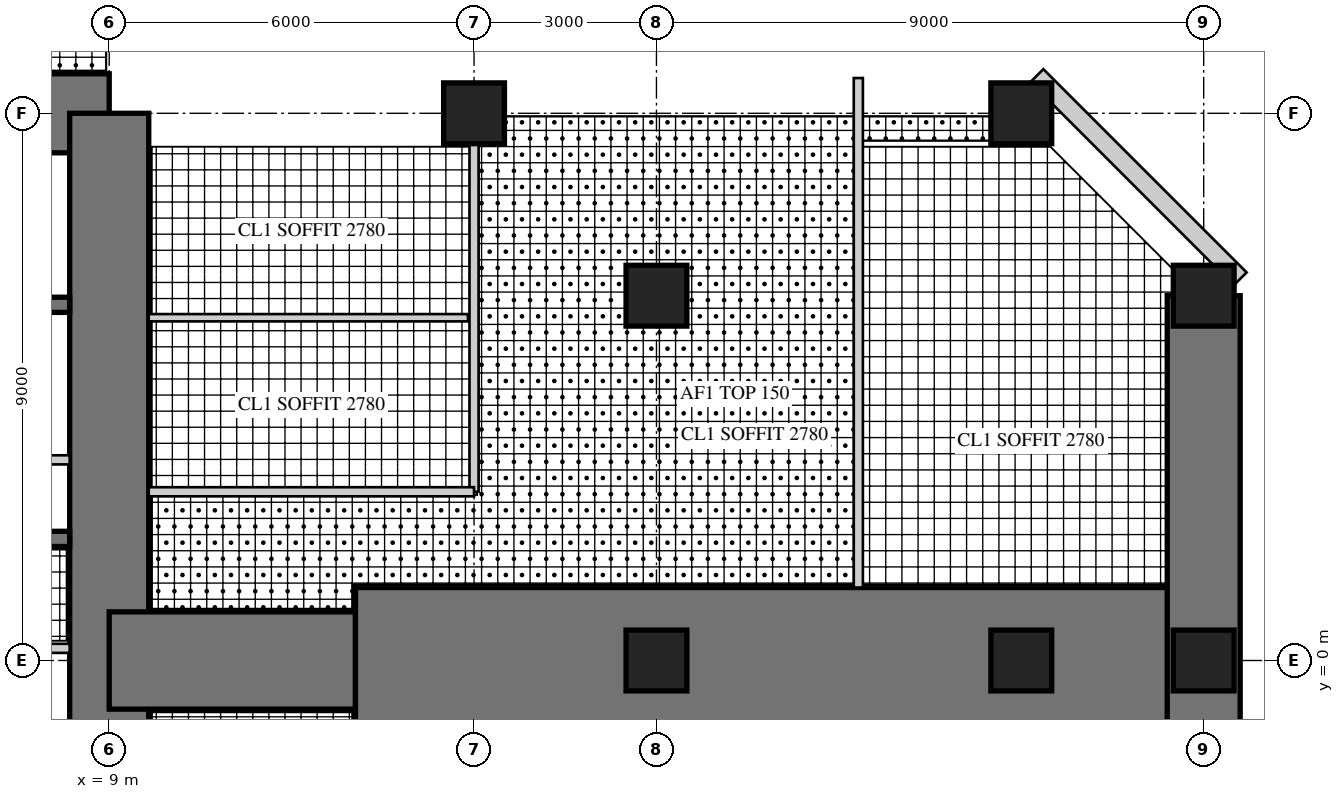
"""IFC4 building model, lengths in metres.
Left out: names, types, materials, properties, quantities, classifications, styles, units other than length and angle.
Written with IfcOpenShell. Run it as: python <this file> out.ifc"""

import sys

from ifc_helpers import new_model, si_unit, direction, frame, frame_2d, origin, origin_2d, place, context, subcontext, project, spatial, rectangle, hollow_rectangle, extrude, element, fill, save


model = new_model("IFC4")
c1 = context("Model", 3, precision=1e-05, world=origin(), true_north=direction((0.0, 1.0)))
c2 = subcontext(c1, "Body", "Model", "MODEL_VIEW")
j1 = project(units=[si_unit("LENGTHUNIT", "METRE"), si_unit("PLANEANGLEUNIT", "RADIAN")], contexts=[c1])
p1 = place(None, origin())
s1 = spatial("IfcSite", under=j1, at=p1, CompositionType="ELEMENT")
p2 = place(p1, origin())
s2 = spatial("IfcBuilding", under=s1, at=p2, CompositionType="ELEMENT")
p3 = place(p2, frame((0.0, 0.0, 152.5)))
s3 = spatial("IfcBuildingStorey", under=s2, at=p3, CompositionType="ELEMENT", Elevation=152.5)
p4 = place(p3, frame((9.0, 9.0, 0.0), z_axis=(0.0, 0.0, 1.0), x_axis=(-1.0, 0.0, 0.0)))
e1 = element("IfcWall", 1, at=p4, inside=s3, PredefinedType="SHEAR", context=c2, shape_type="SweptSolid", body=[
    extrude(rectangle(XDim=18.0, YDim=1.3, at=frame_2d((9.0, 0.0))), origin(), (0.0, 0.0, 1.0), 4.0),
])
p5 = place(p4, frame((9.8, 0.0, 0.0)))
e2 = element("IfcOpeningElement", 2, at=p5, cuts=e1, PredefinedType="OPENING", context=c2, shape_type="SweptSolid", body=[
    extrude(rectangle(XDim=1.0, YDim=2.4, at=frame_2d((0.5, 1.2))), frame((0.0, 0.66, 0.0), z_axis=(0.0, -1.0, 0.0), x_axis=(1.0, 0.0, 0.0)), (0.0, 0.0, 1.0), 1.32),
])
p6 = place(p3, frame((9.0, -9.0, 0.0), z_axis=(0.0, 0.0, 1.0), x_axis=(0.0, 1.0, 0.0)))
e3 = element("IfcWall", 3, at=p6, inside=s3, PredefinedType="SHEAR", context=c2, shape_type="SweptSolid", body=[
    extrude(rectangle(XDim=18.0, YDim=1.3, at=frame_2d((9.0, 0.0))), origin(), (0.0, 0.0, 1.0), 4.0),
])
p7 = place(p6, frame((9.8, 0.0, 0.0)))
e4 = element("IfcOpeningElement", 4, at=p7, cuts=e3, PredefinedType="OPENING", context=c2, shape_type="SweptSolid", body=[
    extrude(rectangle(XDim=1.0, YDim=2.4, at=frame_2d((0.5, 1.2))), frame((0.0, 0.66, 0.0), z_axis=(0.0, -1.0, 0.0), x_axis=(1.0, 0.0, 0.0)), (0.0, 0.0, 1.0), 1.32),
])
p8 = place(p3, frame((1.925, 2.0, 0.0), z_axis=(0.0, 0.0, 1.0), x_axis=(1.0, 0.0, 0.0)))
e5 = element("IfcWall", 5, at=p8, inside=s3, PredefinedType="SHEAR", context=c2, shape_type="SweptSolid", body=[
    extrude(rectangle(XDim=6.425, YDim=0.25, at=frame_2d((3.212, 0.0))), origin(), (0.0, 0.0, 1.0), 4.0),
])
p9 = place(p3, frame((1.925, 5.85, 0.0), z_axis=(0.0, 0.0, 1.0), x_axis=(1.0, 0.0, 0.0)))
e6 = element("IfcWall", 6, at=p9, inside=s3, PredefinedType="SHEAR", context=c2, shape_type="SweptSolid", body=[
    extrude(rectangle(XDim=6.425, YDim=0.25, at=frame_2d((3.212, 0.0))), origin(), (0.0, 0.0, 1.0), 4.0),
])
p10 = place(p9, frame((0.454, 0.0, 0.0)))
e7 = element("IfcOpeningElement", 7, at=p10, cuts=e6, PredefinedType="OPENING", context=c2, shape_type="SweptSolid", body=[
    extrude(rectangle(XDim=1.1, YDim=2.2, at=frame_2d((0.55, 1.1))), frame((0.0, 0.135, 0.0), z_axis=(0.0, -1.0, 0.0), x_axis=(1.0, 0.0, 0.0)), (0.0, 0.0, 1.0), 0.27),
])
p11 = place(p9, frame((2.663, 0.0, 0.0)))
e8 = element("IfcOpeningElement", 8, at=p11, cuts=e6, PredefinedType="OPENING", context=c2, shape_type="SweptSolid", body=[
    extrude(rectangle(XDim=1.1, YDim=2.2, at=frame_2d((0.55, 1.1))), frame((0.0, 0.135, 0.0), z_axis=(0.0, -1.0, 0.0), x_axis=(1.0, 0.0, 0.0)), (0.0, 0.0, 1.0), 0.27),
])
p12 = place(p9, frame((4.871, 0.0, 0.0)))
e9 = element("IfcOpeningElement", 9, at=p12, cuts=e6, PredefinedType="OPENING", context=c2, shape_type="SweptSolid", body=[
    extrude(rectangle(XDim=1.1, YDim=2.2, at=frame_2d((0.55, 1.1))), frame((0.0, 0.135, 0.0), z_axis=(0.0, -1.0, 0.0), x_axis=(1.0, 0.0, 0.0)), (0.0, 0.0, 1.0), 0.27),
])
p13 = place(p3, frame((1.925, 3.3, 0.0), z_axis=(0.0, 0.0, 1.0), x_axis=(1.0, 0.0, 0.0)))
e10 = element("IfcWall", 10, at=p13, inside=s3, PredefinedType="PARTITIONING", context=c2, shape_type="SweptSolid", body=[
    extrude(rectangle(XDim=6.425, YDim=0.15, at=frame_2d((3.212, 0.0))), origin(), (0.0, 0.0, 1.0), 4.0),
])
p14 = place(p13, frame((0.075, 0.0, 0.0)))
e11 = element("IfcOpeningElement", 11, at=p14, cuts=e10, PredefinedType="OPENING", context=c2, shape_type="SweptSolid", body=[
    extrude(rectangle(XDim=0.8, YDim=2.1, at=frame_2d((0.4, 1.05))), frame((0.0, 0.085, 0.0), z_axis=(0.0, -1.0, 0.0), x_axis=(1.0, 0.0, 0.0)), (0.0, 0.0, 1.0), 0.17),
])
p15 = place(p13, frame((3.675, 0.0, 0.0)))
e12 = element("IfcOpeningElement", 12, at=p15, cuts=e10, PredefinedType="OPENING", context=c2, shape_type="SweptSolid", body=[
    extrude(rectangle(XDim=0.8, YDim=2.1, at=frame_2d((0.4, 1.05))), frame((0.0, 0.085, 0.0), z_axis=(0.0, -1.0, 0.0), x_axis=(1.0, 0.0, 0.0)), (0.0, 0.0, 1.0), 0.17),
])
p16 = place(p3, frame((9.0, 0.0, 0.0), z_axis=(0.0, 0.0, 1.0), x_axis=(1.0, 0.0, 0.0)))
e13 = element("IfcWall", 13, at=p16, inside=s3, PredefinedType="SHEAR", context=c2, shape_type="SweptSolid", body=[
    extrude(rectangle(XDim=4.05, YDim=1.6, at=frame_2d((2.025, 0.0))), origin(), (0.0, 0.0, 1.0), 4.0),
])
p17 = place(p3, frame((13.05, 0.0, 0.0), z_axis=(0.0, 0.0, 1.0), x_axis=(1.0, 0.0, 0.0)))
e14 = element("IfcWall", 14, at=p17, inside=s3, PredefinedType="SHEAR", context=c2, shape_type="SweptSolid", body=[
    extrude(rectangle(XDim=13.95, YDim=2.4, at=frame_2d((6.975, 0.0))), origin(), (0.0, 0.0, 1.0), 4.0),
])
p18 = place(p17, frame((5.75, 0.0, 0.0)))
e15 = element("IfcOpeningElement", 15, at=p18, cuts=e14, PredefinedType="OPENING", context=c2, shape_type="SweptSolid", body=[
    extrude(rectangle(XDim=1.0, YDim=2.2, at=frame_2d((0.5, 1.1))), frame((0.0, 1.21, 0.0), z_axis=(0.0, -1.0, 0.0), x_axis=(1.0, 0.0, 0.0)), (0.0, 0.0, 1.0), 2.42),
])
p19 = place(p3, frame((27.0, -6.0, 0.0), z_axis=(0.0, 0.0, 1.0), x_axis=(0.0, 1.0, 0.0)))
e16 = element("IfcWall", 16, at=p19, inside=s3, PredefinedType="SHEAR", context=c2, shape_type="SweptSolid", body=[
    extrude(rectangle(XDim=12.0, YDim=1.2, at=frame_2d((6.0, 0.0))), origin(), (0.0, 0.0, 1.0), 4.0),
])
p20 = place(p19, frame((1.25, 0.0, 0.6)))
e17 = element("IfcOpeningElement", 17, at=p20, cuts=e16, PredefinedType="OPENING", context=c2, shape_type="SweptSolid", body=[
    extrude(rectangle(XDim=3.0, YDim=2.4, at=frame_2d((1.5, 1.2))), frame((0.0, 0.61, 0.0), z_axis=(0.0, -1.0, 0.0), x_axis=(1.0, 0.0, 0.0)), (0.0, 0.0, 1.0), 1.22),
])
p21 = place(p19, frame((7.75, 0.0, 0.6)))
e18 = element("IfcOpeningElement", 18, at=p21, cuts=e16, PredefinedType="OPENING", context=c2, shape_type="SweptSolid", body=[
    extrude(rectangle(XDim=3.0, YDim=2.4, at=frame_2d((1.5, 1.2))), frame((0.0, 0.61, 0.0), z_axis=(0.0, -1.0, 0.0), x_axis=(1.0, 0.0, 0.0)), (0.0, 0.0, 1.0), 1.22),
])
for number, where, z_axis, x_axis in (
    (19, (15.0, 9.0, 0.0), (0.0, 0.0, 1.0), (1.0, 0.0, 0.0)),
    (20, (24.0, 9.0, 0.0), (0.0, 0.0, 1.0), (1.0, 0.0, 0.0)),
    (21, (27.0, 0.0, 0.0), (0.0, 0.0, 1.0), (1.0, 0.0, 0.0)),
    (22, (27.0, 6.0, 0.0), (0.0, 0.0, 1.0), (1.0, 0.0, 0.0)),
    (23, (18.0, 0.0, 0.0), (0.0, 0.0, 1.0), (1.0, 0.0, 0.0)),
    (24, (18.0, 6.0, 0.0), (0.0, 0.0, 1.0), (1.0, 0.0, 0.0)),
    (25, (24.0, 0.0, 0.0), (0.0, 0.0, 1.0), (1.0, 0.0, 0.0)),
):
    element("IfcColumn", number, at=place(p3, frame(where, z_axis=z_axis, x_axis=x_axis)), inside=s3, PredefinedType="COLUMN", context=c2, shape_type="SweptSolid", body=[
        extrude(rectangle(XDim=1.0, YDim=1.0, at=origin_2d()), origin(), (0.0, 0.0, 1.0), 4.0),
    ])
p22 = place(p3, frame((27.6, 6.277, 0.0), z_axis=(0.0, 0.0, 1.0), x_axis=(-0.707106781187, 0.707106781187, 0.0)))
e26 = element("IfcWall", 26, at=p22, inside=s3, PredefinedType="SOLIDWALL", context=c2, shape_type="SweptSolid", body=[
    extrude(rectangle(XDim=4.728, YDim=0.3, at=frame_2d((2.364, 0.0))), origin(), (0.0, 0.0, 1.0), 3.8),
])
p23 = place(p22, frame((1.914, 0.0, 0.3)))
e27 = element("IfcOpeningElement", 27, at=p23, cuts=e26, PredefinedType="OPENING", context=c2, shape_type="SweptSolid", body=[
    extrude(rectangle(XDim=0.9, YDim=2.4, at=frame_2d((0.45, 1.2))), frame((0.0, 0.16, 0.0), z_axis=(0.0, -1.0, 0.0), x_axis=(1.0, 0.0, 0.0)), (0.0, 0.0, 1.0), 0.32),
])
p24 = place(p3, frame((2.325, 0.2, 0.0), z_axis=(0.0, 0.0, 1.0), x_axis=(1.0, 0.0, 0.0)))
e28 = element("IfcWall", 28, at=p24, inside=s3, PredefinedType="PARTITIONING", context=c2, shape_type="SweptSolid", body=[
    extrude(rectangle(XDim=6.025, YDim=0.15, at=frame_2d((3.013, 0.0))), origin(), (0.0, 0.0, 1.0), 3.8),
])
p25 = place(p24, frame((0.4, 0.0, 0.0)))
e29 = element("IfcOpeningElement", 29, at=p25, cuts=e28, PredefinedType="OPENING", context=c2, shape_type="SweptSolid", body=[
    extrude(rectangle(XDim=1.0, YDim=2.1, at=frame_2d((0.5, 1.05))), frame((0.0, 0.085, 0.0), z_axis=(0.0, -1.0, 0.0), x_axis=(1.0, 0.0, 0.0)), (0.0, 0.0, 1.0), 0.17),
])
p26 = place(p3, frame((15.0, 2.775, 0.0), z_axis=(0.0, 0.0, 1.0), x_axis=(0.0, 1.0, 0.0)))
e30 = element("IfcWall", 30, at=p26, inside=s3, PredefinedType="PARTITIONING", context=c2, shape_type="SweptSolid", body=[
    extrude(rectangle(XDim=5.725, YDim=0.15, at=frame_2d((2.863, 0.0))), origin(), (0.0, 0.0, 1.0), 3.0),
])
p27 = place(p26, frame((0.931, 0.0, 0.0)))
e31 = element("IfcOpeningElement", 31, at=p27, cuts=e30, PredefinedType="OPENING", context=c2, shape_type="SweptSolid", body=[
    extrude(rectangle(XDim=1.0, YDim=2.1, at=frame_2d((0.5, 1.05))), frame((0.0, 0.085, 0.0), z_axis=(0.0, -1.0, 0.0), x_axis=(1.0, 0.0, 0.0)), (0.0, 0.0, 1.0), 0.17),
])
p28 = place(p26, frame((3.794, 0.0, 0.0)))
e32 = element("IfcOpeningElement", 32, at=p28, cuts=e30, PredefinedType="OPENING", context=c2, shape_type="SweptSolid", body=[
    extrude(rectangle(XDim=1.0, YDim=2.1, at=frame_2d((0.5, 1.05))), frame((0.0, 0.085, 0.0), z_axis=(0.0, -1.0, 0.0), x_axis=(1.0, 0.0, 0.0)), (0.0, 0.0, 1.0), 0.17),
])
p29 = place(p3, frame((9.65, 2.775, 0.0), z_axis=(0.0, 0.0, 1.0), x_axis=(1.0, 0.0, 0.0)))
e33 = element("IfcWall", 33, at=p29, inside=s3, PredefinedType="PARTITIONING", context=c2, shape_type="SweptSolid", body=[
    extrude(rectangle(XDim=5.35, YDim=0.15, at=frame_2d((2.675, 0.0))), origin(), (0.0, 0.0, 1.0), 3.8),
])
p30 = place(p3, frame((9.65, 5.637, 0.0), z_axis=(0.0, 0.0, 1.0), x_axis=(1.0, 0.0, 0.0)))
e34 = element("IfcWall", 34, at=p30, inside=s3, PredefinedType="PLUMBINGWALL", context=c2, shape_type="SweptSolid", body=[
    extrude(rectangle(XDim=5.25, YDim=0.12, at=frame_2d((2.625, 0.0))), origin(), (0.0, 0.0, 1.0), 3.8),
])
p31 = place(p3, frame((21.32, 1.2, 0.0), z_axis=(0.0, 0.0, 1.0), x_axis=(0.0, 1.0, 0.0)))
e35 = element("IfcWall", 35, at=p31, inside=s3, PredefinedType="PARTITIONING", context=c2, shape_type="SweptSolid", body=[
    extrude(rectangle(XDim=8.38, YDim=0.15, at=frame_2d((4.19, 0.0))), origin(), (0.0, 0.0, 1.0), 3.8),
])
p32 = place(p31, frame((0.45, 0.0, 0.0)))
e36 = element("IfcOpeningElement", 36, at=p32, cuts=e35, PredefinedType="OPENING", context=c2, shape_type="SweptSolid", body=[
    extrude(rectangle(XDim=1.0, YDim=2.2, at=frame_2d((0.5, 1.1))), frame((0.0, 0.085, 0.0), z_axis=(0.0, -1.0, 0.0), x_axis=(1.0, 0.0, 0.0)), (0.0, 0.0, 1.0), 0.17),
])
p33 = place(p21, origin())
e37 = element("IfcWindow", 37, at=p33, inside=s3, PartitioningType="SINGLE_PANEL", PredefinedType="WINDOW", context=c2, shape_type="SweptSolid", body=[
    extrude(hollow_rectangle(XDim=3.0, YDim=2.4, WallThickness=0.06, at=frame_2d((1.5, 1.2))), frame((0.0, 0.03, 0.0), z_axis=(0.0, -1.0, 0.0), x_axis=(1.0, 0.0, 0.0)), (0.0, 0.0, 1.0), 0.06),
    extrude(rectangle(XDim=2.879, YDim=2.279, at=frame_2d((1.5, 1.2))), frame((0.0, 0.03, 0.0), z_axis=(0.0, -1.0, 0.0), x_axis=(1.0, 0.0, 0.0)), (0.0, 0.0, 1.0), 0.06),
])
fill(e18, e37)
p34 = place(p23, origin())
e38 = element("IfcWindow", 38, at=p34, inside=s3, PartitioningType="SINGLE_PANEL", PredefinedType="WINDOW", context=c2, shape_type="SweptSolid", body=[
    extrude(hollow_rectangle(XDim=0.9, YDim=2.4, WallThickness=0.06, at=frame_2d((0.45, 1.2))), frame((0.0, 0.03, 0.0), z_axis=(0.0, -1.0, 0.0), x_axis=(1.0, 0.0, 0.0)), (0.0, 0.0, 1.0), 0.06),
    extrude(rectangle(XDim=0.779, YDim=2.279, at=frame_2d((0.45, 1.2))), frame((0.0, 0.03, 0.0), z_axis=(0.0, -1.0, 0.0), x_axis=(1.0, 0.0, 0.0)), (0.0, 0.0, 1.0), 0.06),
])
fill(e27, e38)
p35 = place(p27, origin())
e39 = element("IfcDoor", 39, at=p35, inside=s3, OperationType="SINGLE_SWING_LEFT", PredefinedType="DOOR", context=c2, shape_type="SweptSolid", body=[
    extrude(rectangle(XDim=1.0, YDim=2.1, at=frame_2d((0.5, 1.05))), frame((0.0, 0.025, 0.0), z_axis=(0.0, -1.0, 0.0), x_axis=(1.0, 0.0, 0.0)), (0.0, 0.0, 1.0), 0.05),
])
fill(e31, e39)
p36 = place(p28, origin())
e40 = element("IfcDoor", 40, at=p36, inside=s3, OperationType="SINGLE_SWING_LEFT", PredefinedType="DOOR", context=c2, shape_type="SweptSolid", body=[
    extrude(rectangle(XDim=1.0, YDim=2.1, at=frame_2d((0.5, 1.05))), frame((0.0, 0.025, 0.0), z_axis=(0.0, -1.0, 0.0), x_axis=(1.0, 0.0, 0.0)), (0.0, 0.0, 1.0), 0.05),
])
fill(e32, e40)
p37 = place(p32, frame((1.0, 0.0, 0.0), z_axis=(0.0, 0.0, 1.0), x_axis=(-1.0, 0.0, 0.0)))
e41 = element("IfcDoor", 41, at=p37, inside=s3, OperationType="SINGLE_SWING_RIGHT", PredefinedType="DOOR", context=c2, shape_type="SweptSolid", body=[
    extrude(rectangle(XDim=1.0, YDim=2.2, at=frame_2d((0.5, 1.1))), frame((0.0, 0.025, 0.0), z_axis=(0.0, -1.0, 0.0), x_axis=(1.0, 0.0, 0.0)), (0.0, 0.0, 1.0), 0.05),
])
fill(e36, e41)
p38 = place(p18, frame((1.0, 0.0, 0.0), z_axis=(0.0, 0.0, 1.0), x_axis=(-1.0, 0.0, 0.0)))
e42 = element("IfcDoor", 42, at=p38, inside=s3, OperationType="SINGLE_SWING_LEFT", PredefinedType="DOOR", context=c2, shape_type="SweptSolid", body=[
    extrude(rectangle(XDim=1.0, YDim=2.2, at=frame_2d((0.5, 1.1))), frame((0.0, 0.025, 0.0), z_axis=(0.0, -1.0, 0.0), x_axis=(1.0, 0.0, 0.0)), (0.0, 0.0, 1.0), 0.05),
])
fill(e15, e42)
p39 = place(p7, frame((1.0, 0.0, 0.0), z_axis=(0.0, 0.0, 1.0), x_axis=(-1.0, 0.0, 0.0)))
e43 = element("IfcDoor", 43, at=p39, inside=s3, OperationType="SINGLE_SWING_RIGHT", PredefinedType="DOOR", context=c2, shape_type="SweptSolid", body=[
    extrude(rectangle(XDim=1.0, YDim=2.4, at=frame_2d((0.5, 1.2))), frame((0.0, -0.005, 0.0), z_axis=(0.0, -1.0, 0.0), x_axis=(1.0, 0.0, 0.0)), (0.0, 0.0, 1.0), 0.05),
])
fill(e4, e43)
save(model, sys.argv[1])
